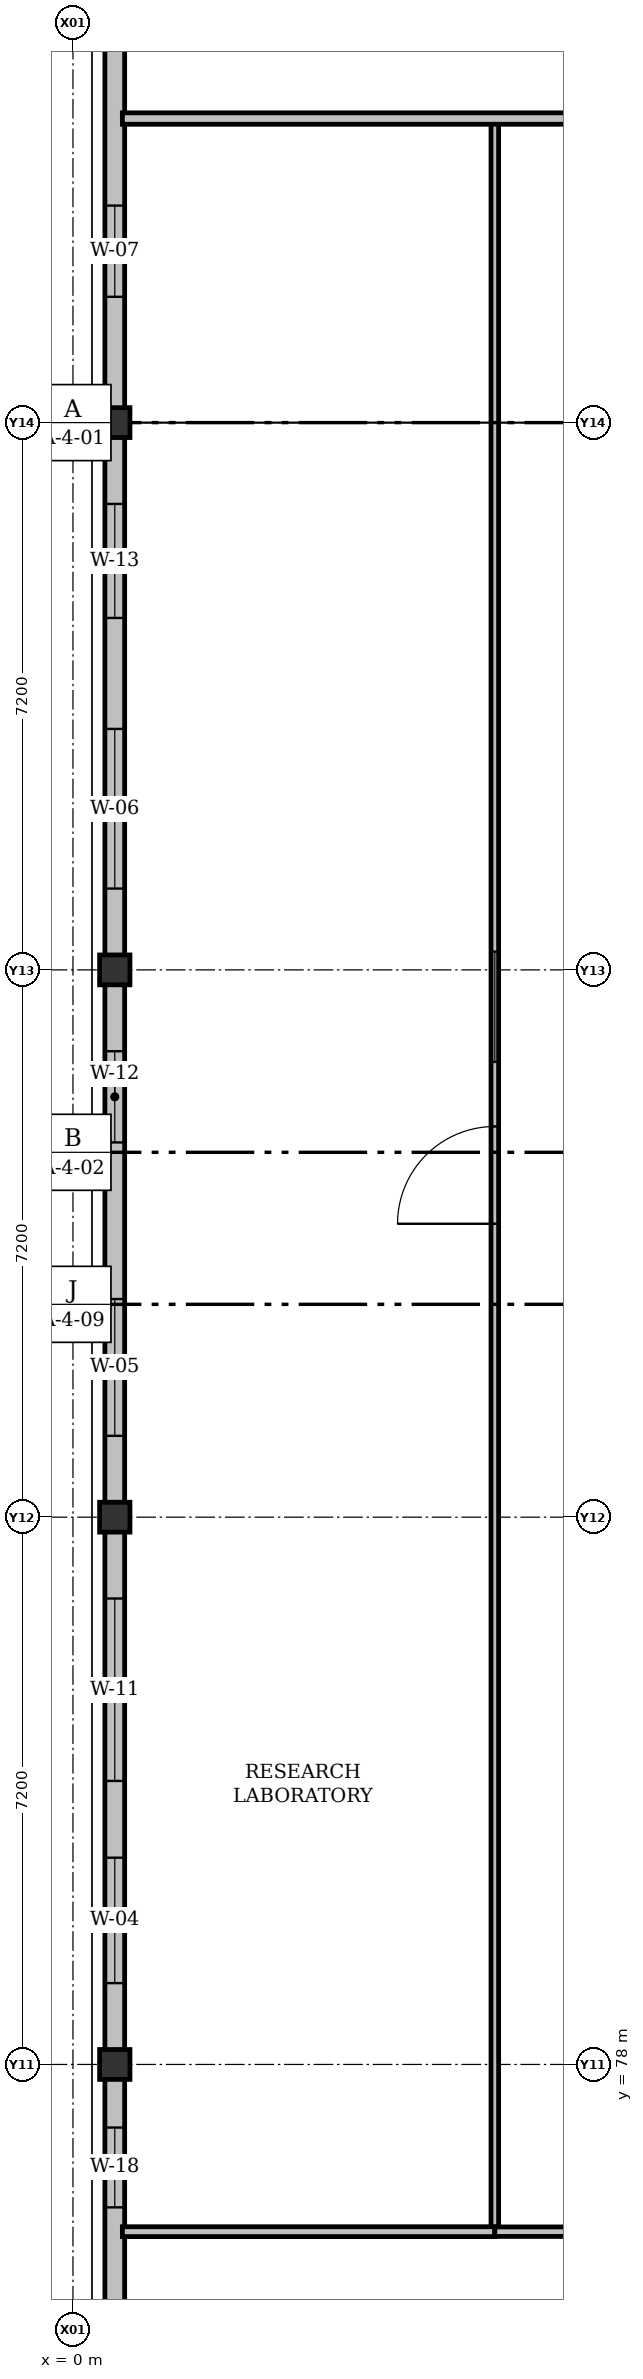
"""IFC4 building model, lengths in metres.
Left out: names, types, materials, properties, quantities, classifications, styles, units other than length and angle.
Written with IfcOpenShell. Run it as: python <this file> out.ifc"""

import sys

from ifc_helpers import new_model, si_unit, direction, frame, frame_2d, origin, origin_2d, place, context, subcontext, project, spatial, rectangle, i_section, extrude, element, fill, save


model = new_model("IFC4")
c1 = context("Model", 3, precision=1e-05, world=origin(), true_north=direction((0.0, 1.0)))
c2 = subcontext(c1, "Body", "Model", "MODEL_VIEW")
j1 = project(units=[si_unit("LENGTHUNIT", "METRE"), si_unit("PLANEANGLEUNIT", "RADIAN")], contexts=[c1])
p1 = place(None, origin())
s1 = spatial("IfcSite", under=j1, at=p1, CompositionType="ELEMENT")
p2 = place(p1, origin())
s2 = spatial("IfcBuilding", under=s1, at=p2, CompositionType="ELEMENT")
p3 = place(p2, frame((0.0, 0.0, 5.4)))
s3 = spatial("IfcBuildingStorey", under=s2, at=p3, CompositionType="ELEMENT", Elevation=5.4)
for number, where, z_axis, x_axis in (
    (1, (0.55, 78.0, 0.0), (0.0, 0.0, 1.0), (1.0, 0.0, 0.0)),
    (2, (0.55, 85.2, 0.0), (0.0, 0.0, 1.0), (1.0, 0.0, 0.0)),
    (3, (0.55, 92.4, 0.0), (0.0, 0.0, 1.0), (1.0, 0.0, 0.0)),
    (4, (0.55, 99.6, 0.0), (0.0, 0.0, 1.0), (1.0, 0.0, 0.0)),
):
    element("IfcColumn", number, at=place(p3, frame(where, z_axis=z_axis, x_axis=x_axis)), inside=s3, PredefinedType="COLUMN", context=c2, shape_type="SweptSolid", body=[
        extrude(i_section(OverallWidth=0.399, OverallDepth=0.393, WebThickness=0.023, FlangeThickness=0.036, FilletRadius=0.015, at=origin_2d()), origin(), (0.0, 0.0, 1.0), 4.5),
    ])
p4 = place(p3, frame((0.55, 70.5, 0.0), z_axis=(0.0, 0.0, 1.0), x_axis=(0.0, 1.0, 0.0)))
e5 = element("IfcWall", 5, at=p4, inside=s3, PredefinedType="SOLIDWALL", context=c2, shape_type="SweptSolid", body=[
    extrude(rectangle(XDim=7.5, YDim=0.26, at=frame_2d((3.75, 0.0))), origin(), (0.0, 0.0, 1.0), 3.847),
])
p5 = place(p4, frame((2.155, 0.0, 0.92)))
e6 = element("IfcOpeningElement", 6, at=p5, cuts=e5, PredefinedType="OPENING", context=c2, shape_type="SweptSolid", body=[
    extrude(rectangle(XDim=1.5, YDim=1.4, at=frame_2d((0.75, 0.7))), frame((0.0, 0.13, 0.0), z_axis=(0.0, -1.0, 0.0), x_axis=(1.0, 0.0, 0.0)), (0.0, 0.0, 1.0), 0.26),
])
p6 = place(p4, frame((5.62, 0.0, 0.92)))
e7 = element("IfcOpeningElement", 7, at=p6, cuts=e5, PredefinedType="OPENING", context=c2, shape_type="SweptSolid", body=[
    extrude(rectangle(XDim=1.05, YDim=1.3, at=frame_2d((0.525, 0.65))), frame((0.0, 0.13, 0.0), z_axis=(0.0, -1.0, 0.0), x_axis=(1.0, 0.0, 0.0)), (0.0, 0.0, 1.0), 0.26),
])
p7 = place(p3, frame((0.55, 78.0, 0.0), z_axis=(0.0, 0.0, 1.0), x_axis=(0.0, 1.0, 0.0)))
e8 = element("IfcWall", 8, at=p7, inside=s3, PredefinedType="SOLIDWALL", context=c2, shape_type="SweptSolid", body=[
    extrude(rectangle(XDim=7.2, YDim=0.26, at=frame_2d((3.6, 0.0))), origin(), (0.0, 0.0, 1.0), 3.847),
])
p8 = place(p7, frame((1.07, 0.0, 0.92)))
e9 = element("IfcOpeningElement", 9, at=p8, cuts=e8, PredefinedType="OPENING", context=c2, shape_type="SweptSolid", body=[
    extrude(rectangle(XDim=1.65, YDim=1.4, at=frame_2d((0.825, 0.7))), frame((0.0, 0.13, 0.0), z_axis=(0.0, -1.0, 0.0), x_axis=(1.0, 0.0, 0.0)), (0.0, 0.0, 1.0), 0.26),
])
p9 = place(p7, frame((3.73, 0.0, 0.92)))
e10 = element("IfcOpeningElement", 10, at=p9, cuts=e8, PredefinedType="OPENING", context=c2, shape_type="SweptSolid", body=[
    extrude(rectangle(XDim=2.4, YDim=1.55, at=frame_2d((1.2, 0.775))), frame((0.0, 0.13, 0.0), z_axis=(0.0, -1.0, 0.0), x_axis=(1.0, 0.0, 0.0)), (0.0, 0.0, 1.0), 0.26),
])
p10 = place(p3, frame((0.55, 85.2, 0.0), z_axis=(0.0, 0.0, 1.0), x_axis=(0.0, 1.0, 0.0)))
e11 = element("IfcWall", 11, at=p10, inside=s3, PredefinedType="SOLIDWALL", context=c2, shape_type="SweptSolid", body=[
    extrude(rectangle(XDim=7.2, YDim=0.26, at=frame_2d((3.6, 0.0))), origin(), (0.0, 0.0, 1.0), 3.847),
])
p11 = place(p10, frame((1.07, 0.0, 0.92)))
e12 = element("IfcOpeningElement", 12, at=p11, cuts=e11, PredefinedType="OPENING", context=c2, shape_type="SweptSolid", body=[
    extrude(rectangle(XDim=1.8, YDim=1.4, at=frame_2d((0.9, 0.7))), frame((0.0, 0.13, 0.0), z_axis=(0.0, -1.0, 0.0), x_axis=(1.0, 0.0, 0.0)), (0.0, 0.0, 1.0), 0.26),
])
p12 = place(p10, frame((4.93, 0.0, 0.92)))
e13 = element("IfcOpeningElement", 13, at=p12, cuts=e11, PredefinedType="OPENING", context=c2, shape_type="SweptSolid", body=[
    extrude(rectangle(XDim=1.2, YDim=1.7, at=frame_2d((0.6, 0.85))), frame((0.0, 0.13, 0.0), z_axis=(0.0, -1.0, 0.0), x_axis=(1.0, 0.0, 0.0)), (0.0, 0.0, 1.0), 0.26),
])
p13 = place(p3, frame((0.55, 92.4, 0.0), z_axis=(0.0, 0.0, 1.0), x_axis=(0.0, 1.0, 0.0)))
e14 = element("IfcWall", 14, at=p13, inside=s3, PredefinedType="SOLIDWALL", context=c2, shape_type="SweptSolid", body=[
    extrude(rectangle(XDim=7.2, YDim=0.26, at=frame_2d((3.6, 0.0))), origin(), (0.0, 0.0, 1.0), 3.847),
])
p14 = place(p13, frame((1.07, 0.0, 0.92)))
e15 = element("IfcOpeningElement", 15, at=p14, cuts=e14, PredefinedType="OPENING", context=c2, shape_type="SweptSolid", body=[
    extrude(rectangle(XDim=2.1, YDim=1.4, at=frame_2d((1.05, 0.7))), frame((0.0, 0.13, 0.0), z_axis=(0.0, -1.0, 0.0), x_axis=(1.0, 0.0, 0.0)), (0.0, 0.0, 1.0), 0.26),
])
p15 = place(p13, frame((4.63, 0.0, 0.92)))
e16 = element("IfcOpeningElement", 16, at=p15, cuts=e14, PredefinedType="OPENING", context=c2, shape_type="SweptSolid", body=[
    extrude(rectangle(XDim=1.5, YDim=1.7, at=frame_2d((0.75, 0.85))), frame((0.0, 0.13, 0.0), z_axis=(0.0, -1.0, 0.0), x_axis=(1.0, 0.0, 0.0)), (0.0, 0.0, 1.0), 0.26),
])
p16 = place(p3, frame((0.55, 99.6, 0.0), z_axis=(0.0, 0.0, 1.0), x_axis=(0.0, 1.0, 0.0)))
e17 = element("IfcWall", 17, at=p16, inside=s3, PredefinedType="SOLIDWALL", context=c2, shape_type="SweptSolid", body=[
    extrude(rectangle(XDim=7.2, YDim=0.26, at=frame_2d((3.6, 0.0))), origin(), (0.0, 0.0, 1.0), 3.847),
])
p17 = place(p16, frame((1.655, 0.0, 0.92)))
e18 = element("IfcOpeningElement", 18, at=p17, cuts=e17, PredefinedType="OPENING", context=c2, shape_type="SweptSolid", body=[
    extrude(rectangle(XDim=1.2, YDim=1.55, at=frame_2d((0.6, 0.775))), frame((0.0, 0.13, 0.0), z_axis=(0.0, -1.0, 0.0), x_axis=(1.0, 0.0, 0.0)), (0.0, 0.0, 1.0), 0.26),
])
p18 = place(p16, frame((4.895, 0.0, 0.92)))
e19 = element("IfcOpeningElement", 19, at=p18, cuts=e17, PredefinedType="OPENING", context=c2, shape_type="SweptSolid", body=[
    extrude(rectangle(XDim=0.9, YDim=1.3, at=frame_2d((0.45, 0.65))), frame((0.0, 0.13, 0.0), z_axis=(0.0, -1.0, 0.0), x_axis=(1.0, 0.0, 0.0)), (0.0, 0.0, 1.0), 0.26),
])
p19 = place(p3, frame((5.55, 75.8, 0.0), z_axis=(0.0, 0.0, 1.0), x_axis=(0.0, 1.0, 0.0)))
e20 = element("IfcWall", 20, at=p19, inside=s3, PredefinedType="PARTITIONING", context=c2, shape_type="SweptSolid", body=[
    extrude(rectangle(XDim=27.8, YDim=0.1, at=frame_2d((13.9, 0.0))), origin(), (0.0, 0.0, 1.0), 3.721),
])
p20 = place(p19, frame((13.26, 0.0, 0.0)))
e21 = element("IfcOpeningElement", 21, at=p20, cuts=e20, PredefinedType="OPENING", context=c2, shape_type="SweptSolid", body=[
    extrude(rectangle(XDim=1.28, YDim=2.25, at=frame_2d((0.64, 1.125))), frame((0.0, 0.05, 0.0), z_axis=(0.0, -1.0, 0.0), x_axis=(1.0, 0.0, 0.0)), (0.0, 0.0, 1.0), 0.1),
])
p21 = place(p19, frame((15.39, 0.0, 0.92)))
e22 = element("IfcOpeningElement", 22, at=p21, cuts=e20, PredefinedType="OPENING", context=c2, shape_type="SweptSolid", body=[
    extrude(rectangle(XDim=1.45, YDim=1.3, at=frame_2d((0.725, 0.65))), frame((0.0, 0.05, 0.0), z_axis=(0.0, -1.0, 0.0), x_axis=(1.0, 0.0, 0.0)), (0.0, 0.0, 1.0), 0.1),
])
p22 = place(p3, frame((0.65, 103.6, 0.0), z_axis=(0.0, 0.0, 1.0), x_axis=(1.0, 0.0, 0.0)))
e23 = element("IfcWall", 23, at=p22, inside=s3, PredefinedType="PARTITIONING", context=c2, shape_type="SweptSolid", body=[
    extrude(rectangle(XDim=28.265, YDim=0.15, at=frame_2d((14.133, 0.0))), origin(), (0.0, 0.0, 1.0), 3.797),
])
p23 = place(p22, frame((9.27, 0.0, 0.0)))
e24 = element("IfcOpeningElement", 24, at=p23, cuts=e23, PredefinedType="OPENING", context=c2, shape_type="SweptSolid", body=[
    extrude(rectangle(XDim=1.36, YDim=2.25, at=frame_2d((0.68, 1.125))), frame((0.0, 0.075, 0.0), z_axis=(0.0, -1.0, 0.0), x_axis=(1.0, 0.0, 0.0)), (0.0, 0.0, 1.0), 0.15),
])
p24 = place(p22, frame((11.48, 0.0, 0.92)))
e25 = element("IfcOpeningElement", 25, at=p24, cuts=e23, PredefinedType="OPENING", context=c2, shape_type="SweptSolid", body=[
    extrude(rectangle(XDim=0.85, YDim=1.1, at=frame_2d((0.425, 0.55))), frame((0.0, 0.075, 0.0), z_axis=(0.0, -1.0, 0.0), x_axis=(1.0, 0.0, 0.0)), (0.0, 0.0, 1.0), 0.15),
])
p25 = place(p3, frame((0.65, 75.8, 0.0), z_axis=(0.0, 0.0, 1.0), x_axis=(1.0, 0.0, 0.0)))
e26 = element("IfcWall", 26, at=p25, inside=s3, PredefinedType="PARTITIONING", context=c2, shape_type="SweptSolid", body=[
    extrude(rectangle(XDim=4.9, YDim=0.13, at=frame_2d((2.45, 0.0))), origin(), (0.0, 0.0, 1.0), 4.25),
])
p26 = place(p3, frame((19.75, 75.8, 0.0), z_axis=(0.0, 0.0, 1.0), x_axis=(-1.0, 0.0, 0.0)))
e27 = element("IfcWall", 27, at=p26, inside=s3, PredefinedType="PARTITIONING", context=c2, shape_type="SweptSolid", body=[
    extrude(rectangle(XDim=14.2, YDim=0.125, at=frame_2d((7.1, 0.0))), origin(), (0.0, 0.0, 1.0), 3.797),
])
p27 = place(p26, frame((7.825, 0.0, 0.0)))
e28 = element("IfcOpeningElement", 28, at=p27, cuts=e27, PredefinedType="OPENING", context=c2, shape_type="SweptSolid", body=[
    extrude(rectangle(XDim=1.75, YDim=2.35, at=frame_2d((0.875, 1.175))), frame((0.0, 0.062, 0.0), z_axis=(0.0, -1.0, 0.0), x_axis=(1.0, 0.0, 0.0)), (0.0, 0.0, 1.0), 0.125),
])
p28 = place(p26, frame((10.425, 0.0, 0.92)))
e29 = element("IfcOpeningElement", 29, at=p28, cuts=e27, PredefinedType="OPENING", context=c2, shape_type="SweptSolid", body=[
    extrude(rectangle(XDim=0.95, YDim=1.1, at=frame_2d((0.475, 0.55))), frame((0.0, 0.062, 0.0), z_axis=(0.0, -1.0, 0.0), x_axis=(1.0, 0.0, 0.0)), (0.0, 0.0, 1.0), 0.125),
])
p29 = place(p6, origin())
e30 = element("IfcWindow", 30, at=p29, inside=s3, PartitioningType="SINGLE_PANEL", PredefinedType="WINDOW", context=c2, shape_type="SweptSolid", body=[
    extrude(rectangle(XDim=1.05, YDim=1.3, at=frame_2d((0.525, 0.65))), frame((0.0, 0.03, 0.0), z_axis=(0.0, -1.0, 0.0), x_axis=(1.0, 0.0, 0.0)), (0.0, 0.0, 1.0), 0.06),
])
fill(e7, e30)
p30 = place(p8, origin())
e31 = element("IfcWindow", 31, at=p30, inside=s3, PartitioningType="DOUBLE_PANEL_VERTICAL", PredefinedType="WINDOW", context=c2, shape_type="SweptSolid", body=[
    extrude(rectangle(XDim=1.65, YDim=1.4, at=frame_2d((0.825, 0.7))), frame((0.0, 0.03, 0.0), z_axis=(0.0, -1.0, 0.0), x_axis=(1.0, 0.0, 0.0)), (0.0, 0.0, 1.0), 0.06),
])
fill(e9, e31)
p31 = place(p9, origin())
e32 = element("IfcWindow", 32, at=p31, inside=s3, PartitioningType="DOUBLE_PANEL_VERTICAL", PredefinedType="WINDOW", context=c2, shape_type="SweptSolid", body=[
    extrude(rectangle(XDim=2.4, YDim=1.55, at=frame_2d((1.2, 0.775))), frame((0.0, 0.03, 0.0), z_axis=(0.0, -1.0, 0.0), x_axis=(1.0, 0.0, 0.0)), (0.0, 0.0, 1.0), 0.06),
])
fill(e10, e32)
p32 = place(p11, origin())
e33 = element("IfcWindow", 33, at=p32, inside=s3, PartitioningType="DOUBLE_PANEL_VERTICAL", PredefinedType="WINDOW", context=c2, shape_type="SweptSolid", body=[
    extrude(rectangle(XDim=1.8, YDim=1.4, at=frame_2d((0.9, 0.7))), frame((0.0, 0.03, 0.0), z_axis=(0.0, -1.0, 0.0), x_axis=(1.0, 0.0, 0.0)), (0.0, 0.0, 1.0), 0.06),
])
fill(e12, e33)
p33 = place(p12, origin())
e34 = element("IfcWindow", 34, at=p33, inside=s3, PartitioningType="SINGLE_PANEL", PredefinedType="WINDOW", context=c2, shape_type="SweptSolid", body=[
    extrude(rectangle(XDim=1.2, YDim=1.7, at=frame_2d((0.6, 0.85))), frame((0.0, 0.03, 0.0), z_axis=(0.0, -1.0, 0.0), x_axis=(1.0, 0.0, 0.0)), (0.0, 0.0, 1.0), 0.06),
])
fill(e13, e34)
p34 = place(p14, origin())
e35 = element("IfcWindow", 35, at=p34, inside=s3, PartitioningType="DOUBLE_PANEL_VERTICAL", PredefinedType="WINDOW", context=c2, shape_type="SweptSolid", body=[
    extrude(rectangle(XDim=2.1, YDim=1.4, at=frame_2d((1.05, 0.7))), frame((0.0, 0.03, 0.0), z_axis=(0.0, -1.0, 0.0), x_axis=(1.0, 0.0, 0.0)), (0.0, 0.0, 1.0), 0.06),
])
fill(e15, e35)
p35 = place(p15, origin())
e36 = element("IfcWindow", 36, at=p35, inside=s3, PartitioningType="SINGLE_PANEL", PredefinedType="WINDOW", context=c2, shape_type="SweptSolid", body=[
    extrude(rectangle(XDim=1.5, YDim=1.7, at=frame_2d((0.75, 0.85))), frame((0.0, 0.03, 0.0), z_axis=(0.0, -1.0, 0.0), x_axis=(1.0, 0.0, 0.0)), (0.0, 0.0, 1.0), 0.06),
])
fill(e16, e36)
p36 = place(p17, origin())
e37 = element("IfcWindow", 37, at=p36, inside=s3, PartitioningType="SINGLE_PANEL", PredefinedType="WINDOW", context=c2, shape_type="SweptSolid", body=[
    extrude(rectangle(XDim=1.2, YDim=1.55, at=frame_2d((0.6, 0.775))), frame((0.0, 0.03, 0.0), z_axis=(0.0, -1.0, 0.0), x_axis=(1.0, 0.0, 0.0)), (0.0, 0.0, 1.0), 0.06),
])
fill(e18, e37)
p37 = place(p20, origin())
e38 = element("IfcDoor", 38, at=p37, inside=s3, OperationType="SINGLE_SWING_LEFT", PredefinedType="DOOR", context=c2, shape_type="SweptSolid", body=[
    extrude(rectangle(XDim=1.28, YDim=2.25, at=frame_2d((0.64, 1.125))), frame((0.0, 0.025, 0.0), z_axis=(0.0, -1.0, 0.0), x_axis=(1.0, 0.0, 0.0)), (0.0, 0.0, 1.0), 0.05),
])
fill(e21, e38)
p38 = place(p21, origin())
e39 = element("IfcWindow", 39, at=p38, inside=s3, PartitioningType="SINGLE_PANEL", PredefinedType="WINDOW", context=c2, shape_type="SweptSolid", body=[
    extrude(rectangle(XDim=1.45, YDim=1.3, at=frame_2d((0.725, 0.65))), frame((0.0, 0.03, 0.0), z_axis=(0.0, -1.0, 0.0), x_axis=(1.0, 0.0, 0.0)), (0.0, 0.0, 1.0), 0.06),
])
fill(e22, e39)
save(model, sys.argv[1])
